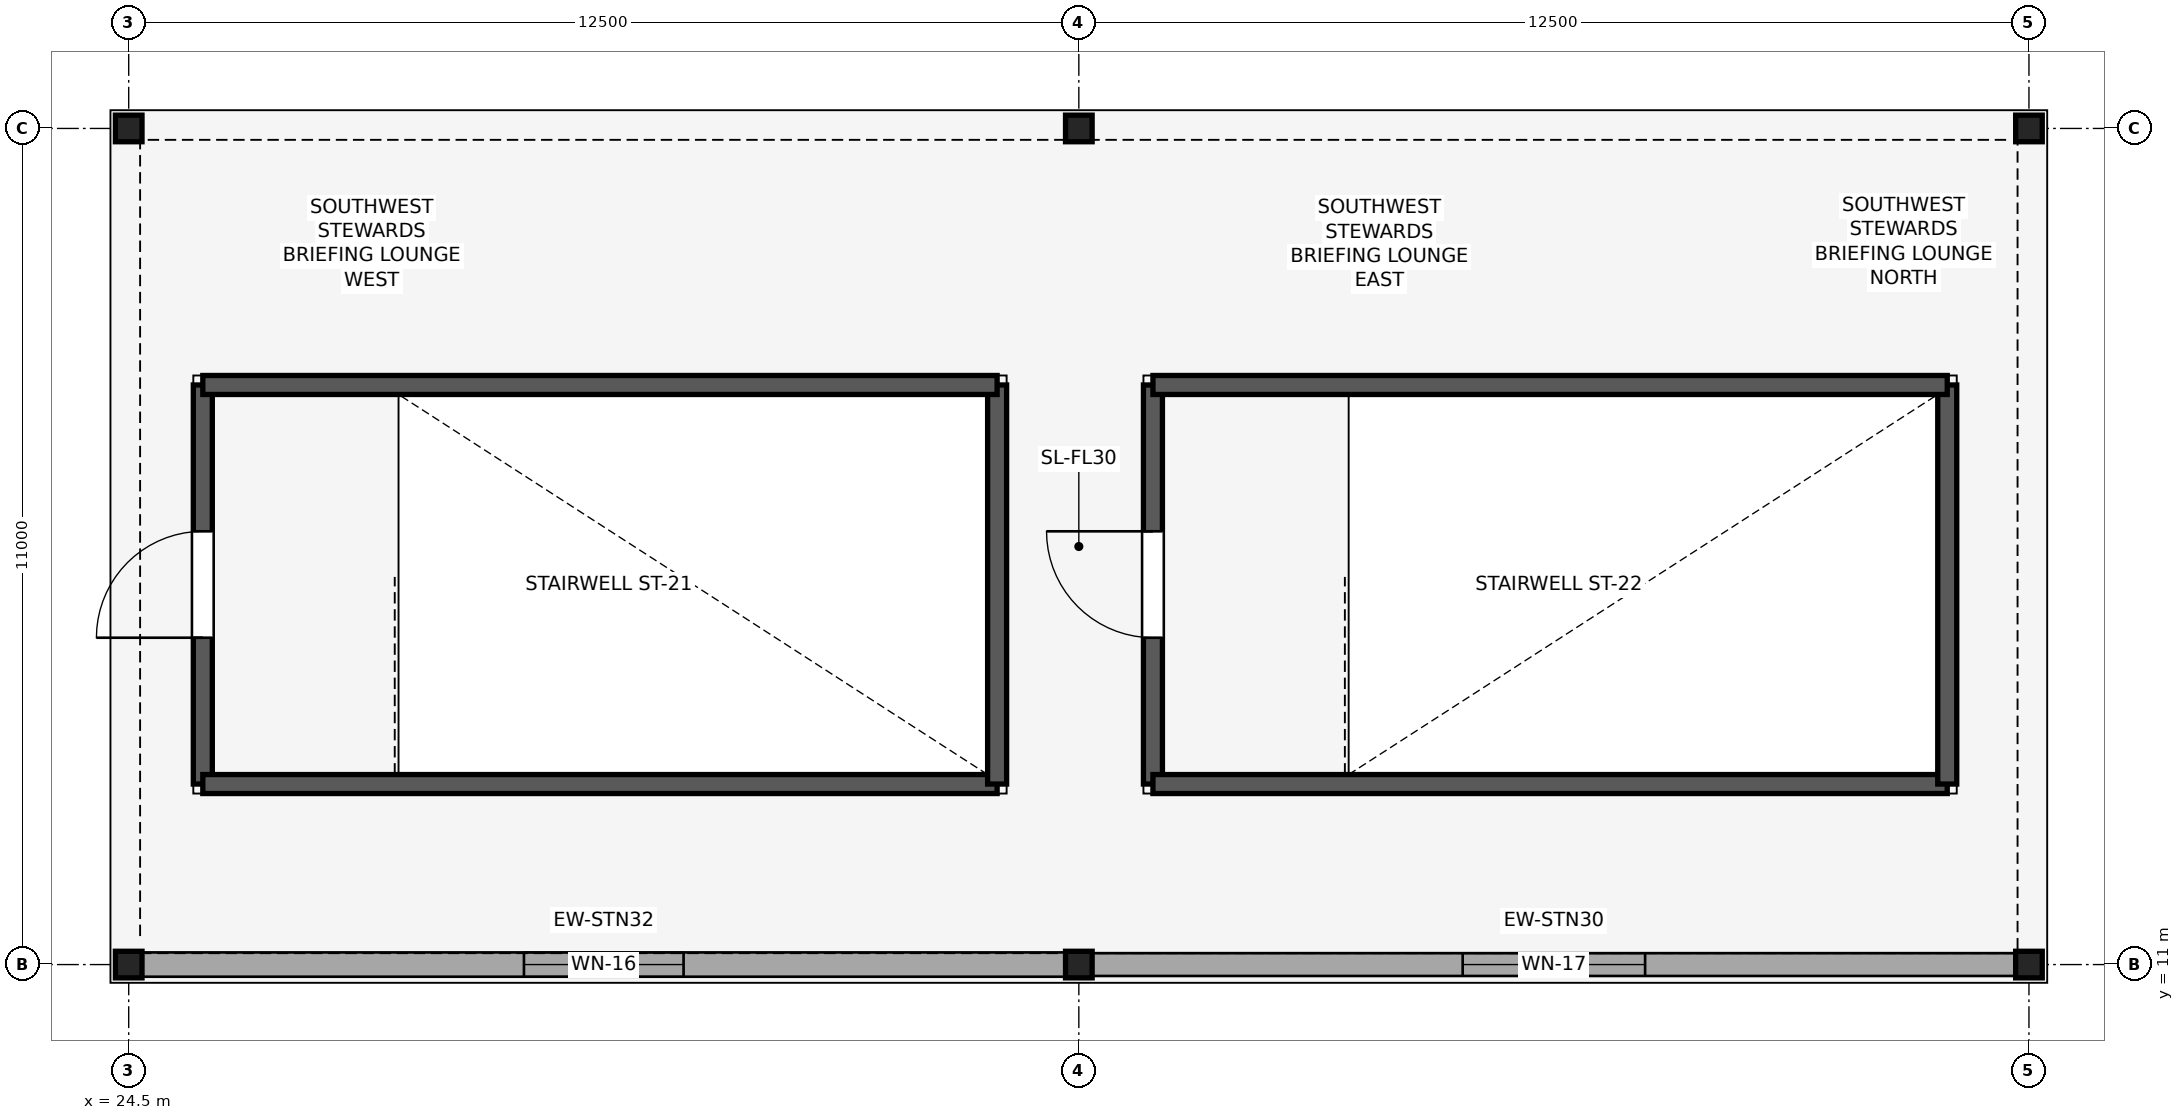
"""IFC4 building model, lengths in metres.
Left out: names, types, materials, properties, quantities, classifications, styles, units other than length and angle.
Written with IfcOpenShell. Run it as: python <this file> out.ifc"""

import sys

from ifc_helpers import new_model, si_unit, direction, frame, frame_2d, origin, origin_2d, place, context, subcontext, project, spatial, rectangle, hollow_rectangle, extrude, element, fill, save


model = new_model("IFC4")
c1 = context("Model", 3, precision=1e-05, world=origin(), true_north=direction((0.0, 1.0)))
c2 = subcontext(c1, "Body", "Model", "MODEL_VIEW")
j1 = project(units=[si_unit("LENGTHUNIT", "METRE"), si_unit("PLANEANGLEUNIT", "RADIAN")], contexts=[c1])
p1 = place(None, origin())
s1 = spatial("IfcSite", under=j1, at=p1, CompositionType="ELEMENT")
p2 = place(p1, origin())
s2 = spatial("IfcBuilding", under=s1, at=p2, CompositionType="ELEMENT")
p3 = place(p2, frame((0.0, 0.0, 5.4)))
s3 = spatial("IfcBuildingStorey", under=s2, at=p3, CompositionType="ELEMENT", Elevation=5.4)
for number, where, z_axis, x_axis in (
    (1, (24.5, 11.0, 0.0), (0.0, 0.0, 1.0), (1.0, 0.0, 0.0)),
    (2, (24.5, 22.0, 0.0), (0.0, 0.0, 1.0), (1.0, 0.0, 0.0)),
    (3, (37.0, 11.0, 0.0), (0.0, 0.0, 1.0), (1.0, 0.0, 0.0)),
    (4, (37.0, 22.0, 0.0), (0.0, 0.0, 1.0), (1.0, 0.0, 0.0)),
    (5, (49.5, 11.0, 0.0), (0.0, 0.0, 1.0), (1.0, 0.0, 0.0)),
    (6, (49.5, 22.0, 0.0), (0.0, 0.0, 1.0), (1.0, 0.0, 0.0)),
):
    element("IfcColumn", number, at=place(p3, frame(where, z_axis=z_axis, x_axis=x_axis)), inside=s3, PredefinedType="COLUMN", context=c2, shape_type="SweptSolid", body=[
        extrude(hollow_rectangle(XDim=0.35, YDim=0.35, WallThickness=0.02, at=origin_2d()), origin(), (0.0, 0.0, 1.0), 5.2),
    ])
p4 = place(p3, frame((24.672, 11.0, 0.0), z_axis=(0.0, 0.0, 1.0), x_axis=(1.0, 0.0, 0.0)))
e7 = element("IfcWall", 7, at=p4, inside=s3, PredefinedType="STANDARD", context=c2, shape_type="SweptSolid", body=[
    extrude(rectangle(XDim=12.156, YDim=0.32, at=frame_2d((6.078, 0.0))), origin(), (0.0, 0.0, 1.0), 4.3),
])
p5 = place(p4, frame((5.028, 0.0, 0.95)))
e8 = element("IfcOpeningElement", 8, at=p5, cuts=e7, PredefinedType="OPENING", context=c2, shape_type="SweptSolid", body=[
    extrude(rectangle(XDim=2.1, YDim=2.1, at=frame_2d((1.05, 1.05))), frame((0.0, 0.17, 0.0), z_axis=(0.0, -1.0, 0.0), x_axis=(1.0, 0.0, 0.0)), (0.0, 0.0, 1.0), 0.34),
])
p6 = place(p3, frame((37.172, 11.0, 0.0), z_axis=(0.0, 0.0, 1.0), x_axis=(1.0, 0.0, 0.0)))
e9 = element("IfcWall", 9, at=p6, inside=s3, PredefinedType="STANDARD", context=c2, shape_type="SweptSolid", body=[
    extrude(rectangle(XDim=12.156, YDim=0.3, at=frame_2d((6.078, 0.0))), origin(), (0.0, 0.0, 1.0), 4.3),
])
p7 = place(p6, frame((4.878, 0.0, 0.95)))
e10 = element("IfcOpeningElement", 10, at=p7, cuts=e9, PredefinedType="OPENING", context=c2, shape_type="SweptSolid", body=[
    extrude(rectangle(XDim=2.4, YDim=1.35, at=frame_2d((1.2, 0.675))), frame((0.0, 0.16, 0.0), z_axis=(0.0, -1.0, 0.0), x_axis=(1.0, 0.0, 0.0)), (0.0, 0.0, 1.0), 0.32),
])
p8 = place(p3, frame((25.475, 18.625, 0.0), z_axis=(0.0, 0.0, 1.0), x_axis=(0.0, -1.0, 0.0)))
e11 = element("IfcWall", 11, at=p8, inside=s3, PredefinedType="SHEAR", context=c2, shape_type="SweptSolid", body=[
    extrude(rectangle(XDim=5.25, YDim=0.25, at=frame_2d((2.625, 0.0))), origin(), (0.0, 0.0, 1.0), 3.2),
])
p9 = place(p8, frame((1.925, 0.0, 0.0)))
e12 = element("IfcOpeningElement", 12, at=p9, cuts=e11, PredefinedType="OPENING", context=c2, shape_type="SweptSolid", body=[
    extrude(rectangle(XDim=1.4, YDim=2.2, at=frame_2d((0.7, 1.1))), frame((0.0, 0.135, 0.0), z_axis=(0.0, -1.0, 0.0), x_axis=(1.0, 0.0, 0.0)), (0.0, 0.0, 1.0), 0.27),
])
p10 = place(p3, frame((25.475, 13.375, 0.0), z_axis=(0.0, 0.0, 1.0), x_axis=(1.0, 0.0, 0.0)))
e13 = element("IfcWall", 13, at=p10, inside=s3, PredefinedType="SHEAR", context=c2, shape_type="SweptSolid", body=[
    extrude(rectangle(XDim=10.45, YDim=0.25, at=frame_2d((5.225, 0.0))), origin(), (0.0, 0.0, 1.0), 3.2),
])
p11 = place(p3, frame((35.925, 13.375, 0.0), z_axis=(0.0, 0.0, 1.0), x_axis=(0.0, 1.0, 0.0)))
e14 = element("IfcWall", 14, at=p11, inside=s3, PredefinedType="SHEAR", context=c2, shape_type="SweptSolid", body=[
    extrude(rectangle(XDim=5.25, YDim=0.25, at=frame_2d((2.625, 0.0))), origin(), (0.0, 0.0, 1.0), 3.2),
])
p12 = place(p3, frame((35.925, 18.625, 0.0), z_axis=(0.0, 0.0, 1.0), x_axis=(-1.0, 0.0, 0.0)))
e15 = element("IfcWall", 15, at=p12, inside=s3, PredefinedType="SHEAR", context=c2, shape_type="SweptSolid", body=[
    extrude(rectangle(XDim=10.45, YDim=0.25, at=frame_2d((5.225, 0.0))), origin(), (0.0, 0.0, 1.0), 3.2),
])
p13 = place(p3, frame((37.975, 18.625, 0.0), z_axis=(0.0, 0.0, 1.0), x_axis=(0.0, -1.0, 0.0)))
e16 = element("IfcWall", 16, at=p13, inside=s3, PredefinedType="SHEAR", context=c2, shape_type="SweptSolid", body=[
    extrude(rectangle(XDim=5.25, YDim=0.25, at=frame_2d((2.625, 0.0))), origin(), (0.0, 0.0, 1.0), 3.2),
])
p14 = place(p13, frame((1.925, 0.0, 0.0)))
e17 = element("IfcOpeningElement", 17, at=p14, cuts=e16, PredefinedType="OPENING", context=c2, shape_type="SweptSolid", body=[
    extrude(rectangle(XDim=1.4, YDim=2.2, at=frame_2d((0.7, 1.1))), frame((0.0, 0.135, 0.0), z_axis=(0.0, -1.0, 0.0), x_axis=(1.0, 0.0, 0.0)), (0.0, 0.0, 1.0), 0.27),
])
p15 = place(p3, frame((37.975, 13.375, 0.0), z_axis=(0.0, 0.0, 1.0), x_axis=(1.0, 0.0, 0.0)))
e18 = element("IfcWall", 18, at=p15, inside=s3, PredefinedType="SHEAR", context=c2, shape_type="SweptSolid", body=[
    extrude(rectangle(XDim=10.45, YDim=0.25, at=frame_2d((5.225, 0.0))), origin(), (0.0, 0.0, 1.0), 3.2),
])
p16 = place(p3, frame((48.425, 13.375, 0.0), z_axis=(0.0, 0.0, 1.0), x_axis=(0.0, 1.0, 0.0)))
e19 = element("IfcWall", 19, at=p16, inside=s3, PredefinedType="SHEAR", context=c2, shape_type="SweptSolid", body=[
    extrude(rectangle(XDim=5.25, YDim=0.25, at=frame_2d((2.625, 0.0))), origin(), (0.0, 0.0, 1.0), 3.2),
])
p17 = place(p3, frame((48.425, 18.625, 0.0), z_axis=(0.0, 0.0, 1.0), x_axis=(-1.0, 0.0, 0.0)))
e20 = element("IfcWall", 20, at=p17, inside=s3, PredefinedType="SHEAR", context=c2, shape_type="SweptSolid", body=[
    extrude(rectangle(XDim=10.45, YDim=0.25, at=frame_2d((5.225, 0.0))), origin(), (0.0, 0.0, 1.0), 3.2),
])
p18 = place(p5, origin())
e21 = element("IfcWindow", 21, at=p18, inside=s3, PartitioningType="SINGLE_PANEL", PredefinedType="WINDOW", context=c2, shape_type="SweptSolid", body=[
    extrude(rectangle(XDim=2.1, YDim=2.1, at=frame_2d((1.05, 1.05))), frame((0.0, 0.03, 0.0), z_axis=(0.0, -1.0, 0.0), x_axis=(1.0, 0.0, 0.0)), (0.0, 0.0, 1.0), 0.06),
])
fill(e8, e21)
p19 = place(p7, origin())
e22 = element("IfcWindow", 22, at=p19, inside=s3, PartitioningType="SINGLE_PANEL", PredefinedType="WINDOW", context=c2, shape_type="SweptSolid", body=[
    extrude(rectangle(XDim=2.4, YDim=1.35, at=frame_2d((1.2, 0.675))), frame((0.0, 0.03, 0.0), z_axis=(0.0, -1.0, 0.0), x_axis=(1.0, 0.0, 0.0)), (0.0, 0.0, 1.0), 0.06),
])
fill(e10, e22)
p20 = place(p9, frame((1.4, 0.0, 0.0), z_axis=(0.0, 0.0, 1.0), x_axis=(-1.0, 0.0, 0.0)))
e23 = element("IfcDoor", 23, at=p20, inside=s3, OperationType="SINGLE_SWING_LEFT", PredefinedType="DOOR", context=c2, shape_type="SweptSolid", body=[
    extrude(rectangle(XDim=1.4, YDim=2.2, at=frame_2d((0.7, 1.1))), frame((0.0, 0.025, 0.0), z_axis=(0.0, -1.0, 0.0), x_axis=(1.0, 0.0, 0.0)), (0.0, 0.0, 1.0), 0.05),
])
fill(e12, e23)
p21 = place(p14, frame((1.4, 0.0, 0.0), z_axis=(0.0, 0.0, 1.0), x_axis=(-1.0, 0.0, 0.0)))
e24 = element("IfcDoor", 24, at=p21, inside=s3, OperationType="SINGLE_SWING_RIGHT", PredefinedType="DOOR", context=c2, shape_type="SweptSolid", body=[
    extrude(rectangle(XDim=1.4, YDim=2.2, at=frame_2d((0.7, 1.1))), frame((0.0, 0.025, 0.0), z_axis=(0.0, -1.0, 0.0), x_axis=(1.0, 0.0, 0.0)), (0.0, 0.0, 1.0), 0.05),
])
fill(e17, e24)
save(model, sys.argv[1])
